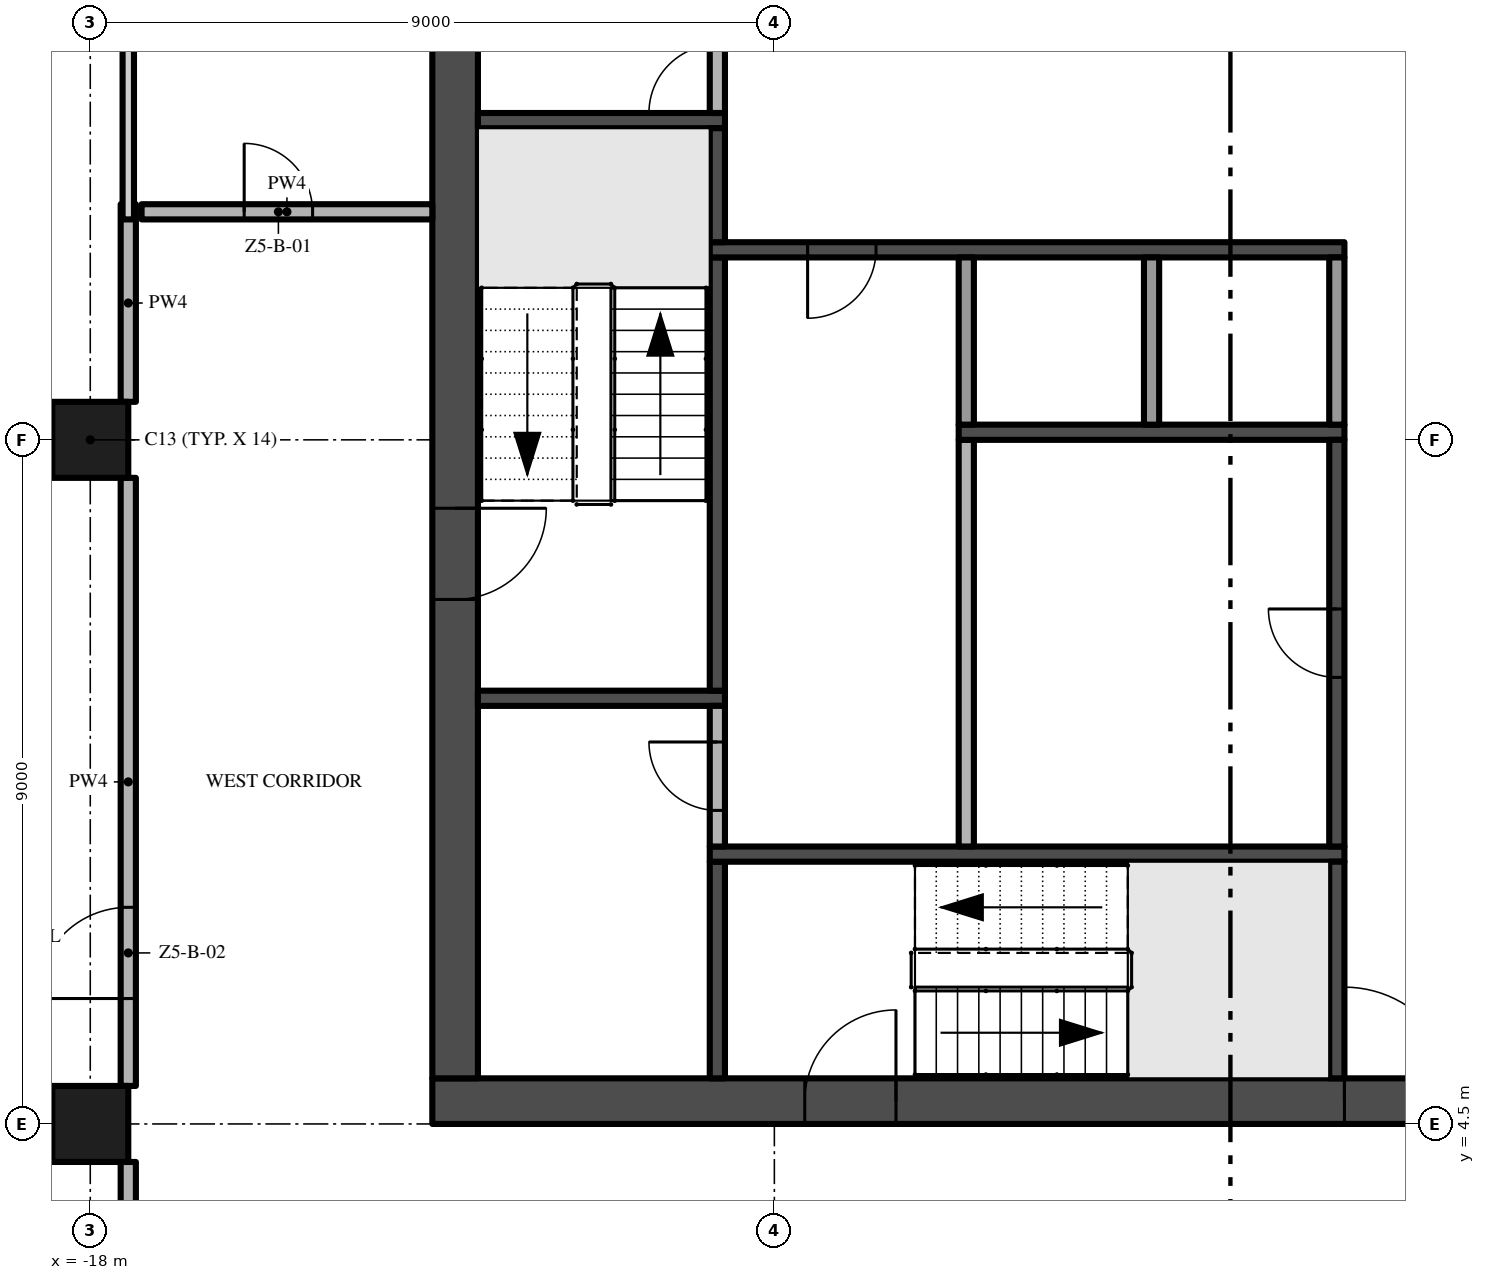
"""IFC4 building model, lengths in metres.
Left out: names, types, materials, properties, quantities, classifications, styles, units other than length and angle.
Written with IfcOpenShell. Run it as: python <this file> out.ifc"""

import sys

from ifc_helpers import new_model, si_unit, direction, frame, frame_2d, origin, origin_2d, place, context, subcontext, project, spatial, rectangle, extrude, element, fill, save


model = new_model("IFC4")
c1 = context("Model", 3, precision=1e-05, world=origin(), true_north=direction((0.0, 1.0)))
c2 = subcontext(c1, "Body", "Model", "MODEL_VIEW")
j1 = project(units=[si_unit("LENGTHUNIT", "METRE"), si_unit("PLANEANGLEUNIT", "RADIAN")], contexts=[c1])
p1 = place(None, origin())
s1 = spatial("IfcSite", under=j1, at=p1, CompositionType="ELEMENT")
p2 = place(p1, origin())
s2 = spatial("IfcBuilding", under=s1, at=p2, CompositionType="ELEMENT")
p3 = place(p2, frame((0.0, 0.0, 254.0)))
s3 = spatial("IfcBuildingStorey", under=s2, at=p3, CompositionType="ELEMENT", Elevation=254.0)
p4 = place(p3, frame((-13.5, 4.8, -0.3), z_axis=(0.0, 0.0, 1.0), x_axis=(1.0, 0.0, 0.0)))
e1 = element("IfcWall", 1, at=p4, inside=s3, PredefinedType="SHEAR", context=c2, shape_type="SweptSolid", body=[
    extrude(rectangle(XDim=27.0, YDim=0.6, at=frame_2d((13.5, 0.0))), origin(), (0.0, 0.0, 1.0), 3.8),
])
p5 = place(p4, frame((12.0, 0.0, 0.3)))
e2 = element("IfcOpeningElement", 2, at=p5, cuts=e1, PredefinedType="OPENING", context=c2, shape_type="SweptSolid", body=[
    extrude(rectangle(XDim=3.0, YDim=2.4, at=frame_2d((1.5, 1.2))), frame((0.0, 0.31, 0.0), z_axis=(0.0, -1.0, 0.0), x_axis=(1.0, 0.0, 0.0)), (0.0, 0.0, 1.0), 0.62),
])
p6 = place(p4, frame((4.9, 0.0, 0.3)))
e3 = element("IfcOpeningElement", 3, at=p6, cuts=e1, PredefinedType="OPENING", context=c2, shape_type="SweptSolid", body=[
    extrude(rectangle(XDim=1.2, YDim=2.2, at=frame_2d((0.6, 1.1))), frame((0.0, 0.31, 0.0), z_axis=(0.0, -1.0, 0.0), x_axis=(1.0, 0.0, 0.0)), (0.0, 0.0, 1.0), 0.62),
])
p7 = place(p4, frame((20.75, 0.0, 0.3)))
e4 = element("IfcOpeningElement", 4, at=p7, cuts=e1, PredefinedType="OPENING", context=c2, shape_type="SweptSolid", body=[
    extrude(rectangle(XDim=1.5, YDim=2.2, at=frame_2d((0.75, 1.1))), frame((0.0, 0.31, 0.0), z_axis=(0.0, -1.0, 0.0), x_axis=(1.0, 0.0, 0.0)), (0.0, 0.0, 1.0), 0.62),
])
p8 = place(p4, frame((17.4, 0.0, 0.3)))
e5 = element("IfcOpeningElement", 5, at=p8, cuts=e1, PredefinedType="OPENING", context=c2, shape_type="SweptSolid", body=[
    extrude(rectangle(XDim=1.2, YDim=2.2, at=frame_2d((0.6, 1.1))), frame((0.0, 0.31, 0.0), z_axis=(0.0, -1.0, 0.0), x_axis=(1.0, 0.0, 0.0)), (0.0, 0.0, 1.0), 0.62),
])
p9 = place(p3, frame((-13.2, 21.9, -0.3), z_axis=(0.0, 0.0, 1.0), x_axis=(0.0, -1.0, 0.0)))
e6 = element("IfcWall", 6, at=p9, inside=s3, PredefinedType="SHEAR", context=c2, shape_type="SweptSolid", body=[
    extrude(rectangle(XDim=16.8, YDim=0.6, at=frame_2d((8.4, 0.0))), origin(), (0.0, 0.0, 1.0), 3.8),
])
p10 = place(p9, frame((9.3, 0.0, 0.3)))
e7 = element("IfcOpeningElement", 7, at=p10, cuts=e6, PredefinedType="OPENING", context=c2, shape_type="SweptSolid", body=[
    extrude(rectangle(XDim=1.2, YDim=2.2, at=frame_2d((0.6, 1.1))), frame((0.0, 0.31, 0.0), z_axis=(0.0, -1.0, 0.0), x_axis=(1.0, 0.0, 0.0)), (0.0, 0.0, 1.0), 0.62),
])
for number, where, z_axis, x_axis in (
    (8, (-18.0, 13.5, 0.0), (0.0, 0.0, 1.0), (1.0, 0.0, 0.0)),
    (9, (-18.0, 4.5, 0.0), (0.0, 0.0, 1.0), (1.0, 0.0, 0.0)),
):
    element("IfcColumn", number, at=place(p3, frame(where, z_axis=z_axis, x_axis=x_axis)), inside=s3, PredefinedType="COLUMN", context=c2, shape_type="SweptSolid", body=[
        extrude(rectangle(XDim=1.0, YDim=1.0, at=origin_2d()), origin(), (0.0, 0.0, 1.0), 3.5),
    ])
for number, where, z_axis, x_axis in (
    (10, (-12.9, 10.1, 0.0), (0.0, 0.0, 1.0), (1.0, 0.0, 0.0)),
    (11, (-12.9, 17.7, 0.0), (0.0, 0.0, 1.0), (1.0, 0.0, 0.0)),
):
    element("IfcWall", number, at=place(p3, frame(where, z_axis=z_axis, x_axis=x_axis)), inside=s3, PredefinedType="SHEAR", context=c2, shape_type="SweptSolid", body=[
        extrude(rectangle(XDim=3.25, YDim=0.2, at=frame_2d((1.625, 0.0))), origin(), (0.0, 0.0, 1.0), 3.5),
    ])
p11 = place(p3, frame((-9.75, 5.1, 0.0), z_axis=(0.0, 0.0, 1.0), x_axis=(0.0, 1.0, 0.0)))
e12 = element("IfcWall", 12, at=p11, inside=s3, PredefinedType="SHEAR", context=c2, shape_type="SweptSolid", body=[
    extrude(rectangle(XDim=2.85, YDim=0.2, at=frame_2d((1.425, 0.0))), origin(), (0.0, 0.0, 1.0), 3.5),
])
p12 = place(p3, frame((-9.85, 8.05, 0.0), z_axis=(0.0, 0.0, 1.0), x_axis=(1.0, 0.0, 0.0)))
e13 = element("IfcWall", 13, at=p12, inside=s3, PredefinedType="SHEAR", context=c2, shape_type="SweptSolid", body=[
    extrude(rectangle(XDim=8.35, YDim=0.2, at=frame_2d((4.175, 0.0))), origin(), (0.0, 0.0, 1.0), 3.5),
])
p13 = place(p3, frame((-9.75, 8.15, 0.0), z_axis=(0.0, 0.0, 1.0), x_axis=(0.0, 1.0, 0.0)))
e14 = element("IfcWall", 14, at=p13, inside=s3, PredefinedType="PARTITIONING", context=c2, shape_type="SweptSolid", body=[
    extrude(rectangle(XDim=1.85, YDim=0.2, at=frame_2d((0.925, 0.0))), origin(), (0.0, 0.0, 1.0), 3.5),
])
p14 = place(p13, frame((0.475, 0.0, 0.0)))
e15 = element("IfcOpeningElement", 15, at=p14, cuts=e14, PredefinedType="OPENING", context=c2, shape_type="SweptSolid", body=[
    extrude(rectangle(XDim=0.9, YDim=2.1, at=frame_2d((0.45, 1.05))), frame((0.0, 0.11, 0.0), z_axis=(0.0, -1.0, 0.0), x_axis=(1.0, 0.0, 0.0)), (0.0, 0.0, 1.0), 0.22),
])
p15 = place(p3, frame((-9.75, 10.2, 0.0), z_axis=(0.0, 0.0, 1.0), x_axis=(0.0, 1.0, 0.0)))
e16 = element("IfcWall", 16, at=p15, inside=s3, PredefinedType="SHEAR", context=c2, shape_type="SweptSolid", body=[
    extrude(rectangle(XDim=5.7, YDim=0.2, at=frame_2d((2.85, 0.0))), origin(), (0.0, 0.0, 1.0), 3.5),
])
p16 = place(p3, frame((-1.5, 16.0, 0.0), z_axis=(0.0, 0.0, 1.0), x_axis=(-1.0, 0.0, 0.0)))
e17 = element("IfcWall", 17, at=p16, inside=s3, PredefinedType="SHEAR", context=c2, shape_type="SweptSolid", body=[
    extrude(rectangle(XDim=8.35, YDim=0.2, at=frame_2d((4.175, 0.0))), origin(), (0.0, 0.0, 1.0), 3.5),
])
p17 = place(p16, frame((6.162, 0.0, 0.0)))
e18 = element("IfcOpeningElement", 18, at=p17, cuts=e17, PredefinedType="OPENING", context=c2, shape_type="SweptSolid", body=[
    extrude(rectangle(XDim=0.9, YDim=2.1, at=frame_2d((0.45, 1.05))), frame((0.0, 0.11, 0.0), z_axis=(0.0, -1.0, 0.0), x_axis=(1.0, 0.0, 0.0)), (0.0, 0.0, 1.0), 0.22),
])
p18 = place(p3, frame((-9.75, 16.1, 0.0), z_axis=(0.0, 0.0, 1.0), x_axis=(0.0, 1.0, 0.0)))
e19 = element("IfcWall", 19, at=p18, inside=s3, PredefinedType="SHEAR", context=c2, shape_type="SweptSolid", body=[
    extrude(rectangle(XDim=1.5, YDim=0.2, at=frame_2d((0.75, 0.0))), origin(), (0.0, 0.0, 1.0), 3.5),
])
p19 = place(p3, frame((-9.75, 17.8, 0.0), z_axis=(0.0, 0.0, 1.0), x_axis=(0.0, 1.0, 0.0)))
e20 = element("IfcWall", 20, at=p19, inside=s3, PredefinedType="PARTITIONING", context=c2, shape_type="SweptSolid", body=[
    extrude(rectangle(XDim=1.4, YDim=0.2, at=frame_2d((0.7, 0.0))), origin(), (0.0, 0.0, 1.0), 3.5),
])
p20 = place(p19, origin())
e21 = element("IfcOpeningElement", 21, at=p20, cuts=e20, PredefinedType="OPENING", context=c2, shape_type="SweptSolid", body=[
    extrude(rectangle(XDim=0.9, YDim=2.1, at=frame_2d((0.45, 1.05))), frame((0.0, 0.11, 0.0), z_axis=(0.0, -1.0, 0.0), x_axis=(1.0, 0.0, 0.0)), (0.0, 0.0, 1.0), 0.22),
])
p21 = place(p3, frame((-6.475, 8.15, 0.0), z_axis=(0.0, 0.0, 1.0), x_axis=(0.0, 1.0, 0.0)))
e22 = element("IfcWall", 22, at=p21, inside=s3, PredefinedType="PARTITIONING", context=c2, shape_type="SweptSolid", body=[
    extrude(rectangle(XDim=5.35, YDim=0.2, at=frame_2d((2.675, 0.0))), origin(), (0.0, 0.0, 1.0), 3.5),
])
p22 = place(p3, frame((-6.575, 13.6, 0.0), z_axis=(0.0, 0.0, 1.0), x_axis=(1.0, 0.0, 0.0)))
e23 = element("IfcWall", 23, at=p22, inside=s3, PredefinedType="SHEAR", context=c2, shape_type="SweptSolid", body=[
    extrude(rectangle(XDim=5.075, YDim=0.2, at=frame_2d((2.538, 0.0))), origin(), (0.0, 0.0, 1.0), 3.5),
])
for number, where, z_axis, x_axis in (
    (24, (-6.475, 13.7, 0.0), (0.0, 0.0, 1.0), (0.0, 1.0, 0.0)),
    (25, (-4.037, 13.7, 0.0), (0.0, 0.0, 1.0), (0.0, 1.0, 0.0)),
):
    element("IfcWall", number, at=place(p3, frame(where, z_axis=z_axis, x_axis=x_axis)), inside=s3, PredefinedType="PARTITIONING", context=c2, shape_type="SweptSolid", body=[
        extrude(rectangle(XDim=2.2, YDim=0.2, at=frame_2d((1.1, 0.0))), origin(), (0.0, 0.0, 1.0), 3.5),
    ])
p23 = place(p3, frame((-1.6, 5.1, 0.0), z_axis=(0.0, 0.0, 1.0), x_axis=(0.0, 1.0, 0.0)))
e26 = element("IfcWall", 26, at=p23, inside=s3, PredefinedType="SHEAR", context=c2, shape_type="SweptSolid", body=[
    extrude(rectangle(XDim=2.85, YDim=0.2, at=frame_2d((1.425, 0.0))), origin(), (0.0, 0.0, 1.0), 3.5),
])
p24 = place(p3, frame((-1.6, 8.15, 0.0), z_axis=(0.0, 0.0, 1.0), x_axis=(0.0, 1.0, 0.0)))
e27 = element("IfcWall", 27, at=p24, inside=s3, PredefinedType="SHEAR", context=c2, shape_type="SweptSolid", body=[
    extrude(rectangle(XDim=5.35, YDim=0.2, at=frame_2d((2.675, 0.0))), origin(), (0.0, 0.0, 1.0), 3.5),
])
p25 = place(p24, frame((2.225, 0.0, 0.0)))
e28 = element("IfcOpeningElement", 28, at=p25, cuts=e27, PredefinedType="OPENING", context=c2, shape_type="SweptSolid", body=[
    extrude(rectangle(XDim=0.9, YDim=2.1, at=frame_2d((0.45, 1.05))), frame((0.0, 0.11, 0.0), z_axis=(0.0, -1.0, 0.0), x_axis=(1.0, 0.0, 0.0)), (0.0, 0.0, 1.0), 0.22),
])
p26 = place(p3, frame((-1.6, 13.7, 0.0), z_axis=(0.0, 0.0, 1.0), x_axis=(0.0, 1.0, 0.0)))
e29 = element("IfcWall", 29, at=p26, inside=s3, PredefinedType="PARTITIONING", context=c2, shape_type="SweptSolid", body=[
    extrude(rectangle(XDim=2.2, YDim=0.2, at=frame_2d((1.1, 0.0))), origin(), (0.0, 0.0, 1.0), 3.5),
])
p27 = place(p3, frame((-17.325, 16.5, 0.0), z_axis=(0.0, 0.0, 1.0), x_axis=(1.0, 0.0, 0.0)))
e30 = element("IfcWall", 30, at=p27, inside=s3, PredefinedType="PARTITIONING", context=c2, shape_type="SweptSolid", body=[
    extrude(rectangle(XDim=3.825, YDim=0.2, at=frame_2d((1.913, 0.0))), origin(), (0.0, 0.0, 1.0), 3.5),
])
p28 = place(p27, frame((1.35, 0.0, 0.0)))
e31 = element("IfcOpeningElement", 31, at=p28, cuts=e30, PredefinedType="OPENING", context=c2, shape_type="SweptSolid", body=[
    extrude(rectangle(XDim=0.9, YDim=2.1, at=frame_2d((0.45, 1.05))), frame((0.0, 0.11, 0.0), z_axis=(0.0, -1.0, 0.0), x_axis=(1.0, 0.0, 0.0)), (0.0, 0.0, 1.0), 0.22),
])
p29 = place(p3, frame((-17.5, -0.2, 0.0), z_axis=(0.0, 0.0, 1.0), x_axis=(0.0, 1.0, 0.0)))
e32 = element("IfcWall", 32, at=p29, inside=s3, PredefinedType="PARTITIONING", context=c2, shape_type="SweptSolid", body=[
    extrude(rectangle(XDim=4.2, YDim=0.2, at=frame_2d((2.1, 0.0))), origin(), (0.0, 0.0, 1.0), 3.5),
])
p30 = place(p3, frame((-17.5, 5.0, 0.0), z_axis=(0.0, 0.0, 1.0), x_axis=(0.0, 1.0, 0.0)))
e33 = element("IfcWall", 33, at=p30, inside=s3, PredefinedType="PARTITIONING", context=c2, shape_type="SweptSolid", body=[
    extrude(rectangle(XDim=8.0, YDim=0.2, at=frame_2d((4.0, 0.0))), origin(), (0.0, 0.0, 1.0), 3.5),
])
p31 = place(p30, frame((1.15, 0.0, 0.0)))
e34 = element("IfcOpeningElement", 34, at=p31, cuts=e33, PredefinedType="OPENING", context=c2, shape_type="SweptSolid", body=[
    extrude(rectangle(XDim=1.2, YDim=2.4, at=frame_2d((0.6, 1.2))), frame((0.0, 0.11, 0.0), z_axis=(0.0, -1.0, 0.0), x_axis=(1.0, 0.0, 0.0)), (0.0, 0.0, 1.0), 0.22),
])
p32 = place(p3, frame((-17.5, 14.0, 0.0), z_axis=(0.0, 0.0, 1.0), x_axis=(0.0, 1.0, 0.0)))
e35 = element("IfcWall", 35, at=p32, inside=s3, PredefinedType="PARTITIONING", context=c2, shape_type="SweptSolid", body=[
    extrude(rectangle(XDim=2.6, YDim=0.2, at=frame_2d((1.3, 0.0))), origin(), (0.0, 0.0, 1.0), 3.5),
])
p33 = place(p3, frame((-17.5, 16.4, 0.0), z_axis=(0.0, 0.0, 1.0), x_axis=(0.0, 1.0, 0.0)))
e36 = element("IfcWall", 36, at=p33, inside=s3, PredefinedType="PARTITIONING", context=c2, shape_type="SweptSolid", body=[
    extrude(rectangle(XDim=5.2, YDim=0.15, at=frame_2d((2.6, 0.0))), origin(), (0.0, 0.0, 1.0), 3.5),
])
p34 = place(p5, frame((3.0, 0.0, 0.0), z_axis=(0.0, 0.0, 1.0), x_axis=(-1.0, 0.0, 0.0)))
e37 = element("IfcDoor", 37, at=p34, inside=s3, OperationType="DOUBLE_DOOR_SINGLE_SWING", PredefinedType="DOOR", context=c2, shape_type="SweptSolid", body=[
    extrude(rectangle(XDim=3.0, YDim=2.4, at=frame_2d((1.5, 1.2))), frame((0.0, 0.025, 0.0), z_axis=(0.0, -1.0, 0.0), x_axis=(1.0, 0.0, 0.0)), (0.0, 0.0, 1.0), 0.05),
])
fill(e2, e37)
p35 = place(p10, frame((1.2, 0.0, 0.0), z_axis=(0.0, 0.0, 1.0), x_axis=(-1.0, 0.0, 0.0)))
e38 = element("IfcDoor", 38, at=p35, inside=s3, OperationType="SINGLE_SWING_RIGHT", PredefinedType="DOOR", context=c2, shape_type="SweptSolid", body=[
    extrude(rectangle(XDim=1.2, YDim=2.2, at=frame_2d((0.6, 1.1))), frame((0.0, 0.025, 0.0), z_axis=(0.0, -1.0, 0.0), x_axis=(1.0, 0.0, 0.0)), (0.0, 0.0, 1.0), 0.05),
])
fill(e7, e38)
p36 = place(p6, frame((1.2, 0.0, 0.0), z_axis=(0.0, 0.0, 1.0), x_axis=(-1.0, 0.0, 0.0)))
e39 = element("IfcDoor", 39, at=p36, inside=s3, OperationType="SINGLE_SWING_LEFT", PredefinedType="DOOR", context=c2, shape_type="SweptSolid", body=[
    extrude(rectangle(XDim=1.2, YDim=2.2, at=frame_2d((0.6, 1.1))), frame((0.0, 0.025, 0.0), z_axis=(0.0, -1.0, 0.0), x_axis=(1.0, 0.0, 0.0)), (0.0, 0.0, 1.0), 0.05),
])
fill(e3, e39)
p37 = place(p17, origin())
e40 = element("IfcDoor", 40, at=p37, inside=s3, OperationType="SINGLE_SWING_RIGHT", PredefinedType="DOOR", context=c2, shape_type="SweptSolid", body=[
    extrude(rectangle(XDim=0.9, YDim=2.1, at=frame_2d((0.45, 1.05))), frame((0.0, 0.025, 0.0), z_axis=(0.0, -1.0, 0.0), x_axis=(1.0, 0.0, 0.0)), (0.0, 0.0, 1.0), 0.05),
])
fill(e18, e40)
p38 = place(p25, origin())
e41 = element("IfcDoor", 41, at=p38, inside=s3, OperationType="SINGLE_SWING_RIGHT", PredefinedType="DOOR", context=c2, shape_type="SweptSolid", body=[
    extrude(rectangle(XDim=0.9, YDim=2.1, at=frame_2d((0.45, 1.05))), frame((0.0, 0.025, 0.0), z_axis=(0.0, -1.0, 0.0), x_axis=(1.0, 0.0, 0.0)), (0.0, 0.0, 1.0), 0.05),
])
fill(e28, e41)
p39 = place(p20, origin())
e42 = element("IfcDoor", 42, at=p39, inside=s3, OperationType="SINGLE_SWING_LEFT", PredefinedType="DOOR", context=c2, shape_type="SweptSolid", body=[
    extrude(rectangle(XDim=0.9, YDim=2.1, at=frame_2d((0.45, 1.05))), frame((0.0, 0.025, 0.0), z_axis=(0.0, -1.0, 0.0), x_axis=(1.0, 0.0, 0.0)), (0.0, 0.0, 1.0), 0.05),
])
fill(e21, e42)
p40 = place(p14, origin())
e43 = element("IfcDoor", 43, at=p40, inside=s3, OperationType="SINGLE_SWING_RIGHT", PredefinedType="DOOR", context=c2, shape_type="SweptSolid", body=[
    extrude(rectangle(XDim=0.9, YDim=2.1, at=frame_2d((0.45, 1.05))), frame((0.0, 0.025, 0.0), z_axis=(0.0, -1.0, 0.0), x_axis=(1.0, 0.0, 0.0)), (0.0, 0.0, 1.0), 0.05),
])
fill(e15, e43)
p41 = place(p28, origin())
e44 = element("IfcDoor", 44, at=p41, inside=s3, OperationType="SINGLE_SWING_LEFT", PredefinedType="DOOR", context=c2, shape_type="SweptSolid", body=[
    extrude(rectangle(XDim=0.9, YDim=2.1, at=frame_2d((0.45, 1.05))), frame((0.0, 0.025, 0.0), z_axis=(0.0, -1.0, 0.0), x_axis=(1.0, 0.0, 0.0)), (0.0, 0.0, 1.0), 0.05),
])
fill(e31, e44)
p42 = place(p31, origin())
e45 = element("IfcDoor", 45, at=p42, inside=s3, OperationType="SINGLE_SWING_LEFT", PredefinedType="DOOR", context=c2, shape_type="SweptSolid", body=[
    extrude(rectangle(XDim=1.2, YDim=2.4, at=frame_2d((0.6, 1.2))), frame((0.0, 0.025, 0.0), z_axis=(0.0, -1.0, 0.0), x_axis=(1.0, 0.0, 0.0)), (0.0, 0.0, 1.0), 0.05),
])
fill(e34, e45)
save(model, sys.argv[1])
